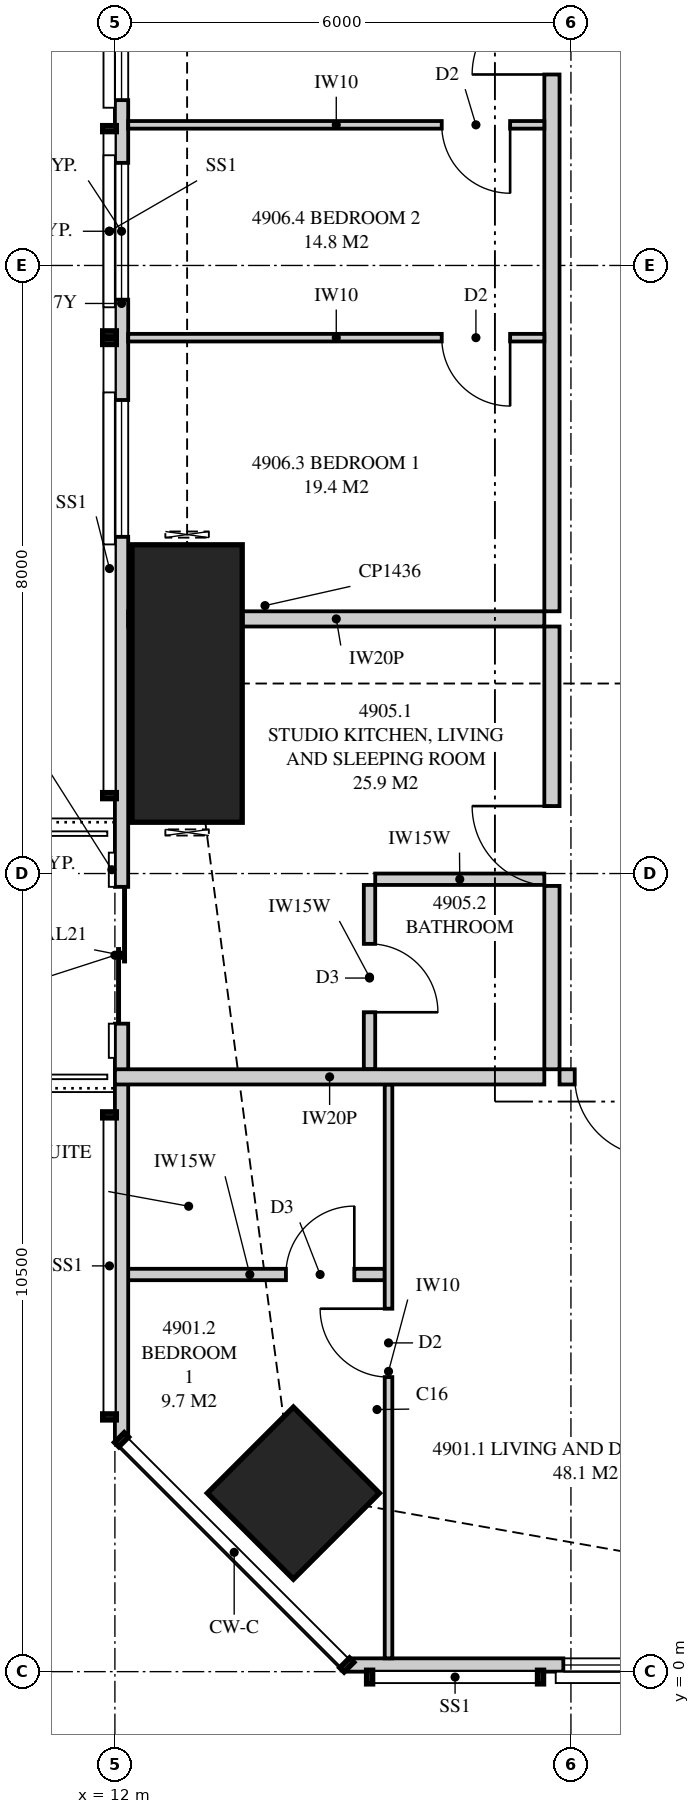
"""IFC4 building model, lengths in metres.
Left out: names, types, materials, properties, quantities, classifications, styles, units other than length and angle.
Written with IfcOpenShell. Run it as: python <this file> out.ifc"""

import sys

from ifc_helpers import new_model, si_unit, direction, frame, frame_2d, origin, origin_2d, place, context, subcontext, project, spatial, polyline, rectangle, outline, extrude, element, fill, save


model = new_model("IFC4")
c1 = context("Model", 3, precision=1e-05, world=origin(), true_north=direction((0.0, 1.0)))
c2 = subcontext(c1, "Body", "Model", "MODEL_VIEW")
j1 = project(units=[si_unit("LENGTHUNIT", "METRE"), si_unit("PLANEANGLEUNIT", "RADIAN")], contexts=[c1])
p1 = place(None, origin())
s1 = spatial("IfcSite", under=j1, at=p1, CompositionType="ELEMENT")
p2 = place(p1, origin())
s2 = spatial("IfcBuilding", under=s1, at=p2, CompositionType="ELEMENT")
p3 = place(p2, frame((0.0, 0.0, 181.15)))
s3 = spatial("IfcBuildingStorey", under=s2, at=p3, CompositionType="ELEMENT", Elevation=181.15)
p4 = place(p3, frame((14.348, 2.348, 0.0), z_axis=(0.0, 0.0, 1.0), x_axis=(0.707106781187, 0.707106781187, 0.0)))
e1 = element("IfcColumn", 1, at=p4, inside=s3, PredefinedType="COLUMN", context=c2, shape_type="SweptSolid", body=[
    extrude(rectangle(XDim=1.6, YDim=1.6, at=origin_2d()), origin(), (0.0, 0.0, 1.0), 3.35),
])
p5 = place(p3, frame((12.95, 13.0, 0.0), z_axis=(0.0, 0.0, 1.0), x_axis=(1.0, 0.0, 0.0)))
e2 = element("IfcColumn", 2, at=p5, inside=s3, PredefinedType="COLUMN", context=c2, shape_type="SweptSolid", body=[
    extrude(rectangle(XDim=1.45, YDim=3.65, at=origin_2d()), origin(), (0.0, 0.0, 1.0), 3.35),
])
p6 = place(p3, frame((15.051, 0.087, 0.0), z_axis=(0.0, 0.0, 1.0), x_axis=(1.0, 0.0, 0.0)))
e3 = element("IfcWall", 3, at=p6, inside=s3, PredefinedType="SOLIDWALL", context=c2, shape_type="SweptSolid", body=[
    extrude(outline(polyline([(0.0, 0.0), (34.897, 0.0), (34.897, 3.11), (27.91, 3.11), (27.91, 2.15), (27.836, 2.15), (27.836, 3.11), (27.699, 3.11), (27.699, 2.15), (7.199, 2.15), (7.199, 3.11), (7.062, 3.11), (7.062, 2.15), (6.987, 2.15), (6.987, 3.11), (0.0, 3.11), (0.0, 0.0)])), frame((0.0, 0.087, 0.0), z_axis=(0.0, -1.0, 0.0), x_axis=(1.0, 0.0, 0.0)), (0.0, 0.0, 1.0), 0.175),
])
p7 = place(p6, frame((2.849, 0.0, 0.4)))
e4 = element("IfcOpeningElement", 4, at=p7, cuts=e3, PredefinedType="OPENING", context=c2, shape_type="SweptSolid", body=[
    extrude(rectangle(XDim=2.4, YDim=1.7, at=frame_2d((1.2, 0.85))), frame((0.0, 0.097, 0.0), z_axis=(0.0, -1.0, 0.0), x_axis=(1.0, 0.0, 0.0)), (0.0, 0.0, 1.0), 0.195),
])
p8 = place(p6, frame((9.449, 0.0, 0.4)))
e5 = element("IfcOpeningElement", 5, at=p8, cuts=e3, PredefinedType="OPENING", context=c2, shape_type="SweptSolid", body=[
    extrude(rectangle(XDim=1.8, YDim=1.7, at=frame_2d((0.9, 0.85))), frame((0.0, 0.097, 0.0), z_axis=(0.0, -1.0, 0.0), x_axis=(1.0, 0.0, 0.0)), (0.0, 0.0, 1.0), 0.195),
])
p9 = place(p6, frame((13.561, 0.0, 0.0)))
e6 = element("IfcOpeningElement", 6, at=p9, cuts=e3, PredefinedType="OPENING", context=c2, shape_type="SweptSolid", body=[
    extrude(rectangle(XDim=1.8, YDim=2.1, at=frame_2d((0.9, 1.05))), frame((0.0, 0.097, 0.0), z_axis=(0.0, -1.0, 0.0), x_axis=(1.0, 0.0, 0.0)), (0.0, 0.0, 1.0), 0.195),
])
p10 = place(p6, frame((20.599, 0.0, 0.4)))
e7 = element("IfcOpeningElement", 7, at=p10, cuts=e3, PredefinedType="OPENING", context=c2, shape_type="SweptSolid", body=[
    extrude(rectangle(XDim=1.8, YDim=1.7, at=frame_2d((0.9, 0.85))), frame((0.0, 0.097, 0.0), z_axis=(0.0, -1.0, 0.0), x_axis=(1.0, 0.0, 0.0)), (0.0, 0.0, 1.0), 0.195),
])
p11 = place(p6, frame((23.974, 0.0, 0.4)))
e8 = element("IfcOpeningElement", 8, at=p11, cuts=e3, PredefinedType="OPENING", context=c2, shape_type="SweptSolid", body=[
    extrude(rectangle(XDim=1.8, YDim=1.7, at=frame_2d((0.9, 0.85))), frame((0.0, 0.097, 0.0), z_axis=(0.0, -1.0, 0.0), x_axis=(1.0, 0.0, 0.0)), (0.0, 0.0, 1.0), 0.195),
])
p12 = place(p6, frame((29.659, 0.0, 0.4)))
e9 = element("IfcOpeningElement", 9, at=p12, cuts=e3, PredefinedType="OPENING", context=c2, shape_type="SweptSolid", body=[
    extrude(rectangle(XDim=2.4, YDim=1.7, at=frame_2d((1.2, 0.85))), frame((0.0, 0.097, 0.0), z_axis=(0.0, -1.0, 0.0), x_axis=(1.0, 0.0, 0.0)), (0.0, 0.0, 1.0), 0.195),
])
p13 = place(p3, frame((12.087, 32.949, 0.0), z_axis=(0.0, 0.0, 1.0), x_axis=(0.0, -1.0, 0.0)))
e10 = element("IfcWall", 10, at=p13, inside=s3, PredefinedType="SOLIDWALL", context=c2, shape_type="SweptSolid", body=[
    extrude(outline(polyline([(0.0, 0.0), (29.897, 0.0), (29.897, 3.11), (20.191, 3.11), (20.191, 2.15), (20.051, 2.15), (20.051, 3.11), (19.949, 3.11), (19.949, 2.15), (7.949, 2.15), (7.949, 3.11), (7.823, 3.11), (7.823, 2.15), (7.73, 2.15), (7.73, 3.11), (0.0, 3.11), (0.0, 0.0)])), frame((0.0, 0.087, 0.0), z_axis=(0.0, -1.0, 0.0), x_axis=(1.0, 0.0, 0.0)), (0.0, 0.0, 1.0), 0.175),
])
p14 = place(p13, frame((1.237, 0.0, 0.4)))
e11 = element("IfcOpeningElement", 11, at=p14, cuts=e10, PredefinedType="OPENING", context=c2, shape_type="SweptSolid", body=[
    extrude(rectangle(XDim=1.2, YDim=1.7, at=frame_2d((0.6, 0.85))), frame((0.0, 0.097, 0.0), z_axis=(0.0, -1.0, 0.0), x_axis=(1.0, 0.0, 0.0)), (0.0, 0.0, 1.0), 0.195),
])
p15 = place(p13, frame((9.874, 0.0, 0.4)))
e12 = element("IfcOpeningElement", 12, at=p15, cuts=e10, PredefinedType="OPENING", context=c2, shape_type="SweptSolid", body=[
    extrude(rectangle(XDim=2.4, YDim=1.7, at=frame_2d((1.2, 0.85))), frame((0.0, 0.097, 0.0), z_axis=(0.0, -1.0, 0.0), x_axis=(1.0, 0.0, 0.0)), (0.0, 0.0, 1.0), 0.195),
])
p16 = place(p13, frame((13.099, 0.0, 0.4)))
e13 = element("IfcOpeningElement", 13, at=p16, cuts=e10, PredefinedType="OPENING", context=c2, shape_type="SweptSolid", body=[
    extrude(rectangle(XDim=1.8, YDim=1.7, at=frame_2d((0.9, 0.85))), frame((0.0, 0.097, 0.0), z_axis=(0.0, -1.0, 0.0), x_axis=(1.0, 0.0, 0.0)), (0.0, 0.0, 1.0), 0.195),
])
p17 = place(p13, frame((16.219, 0.0, 0.4)))
e14 = element("IfcOpeningElement", 14, at=p17, cuts=e10, PredefinedType="OPENING", context=c2, shape_type="SweptSolid", body=[
    extrude(rectangle(XDim=1.8, YDim=1.7, at=frame_2d((0.9, 0.85))), frame((0.0, 0.097, 0.0), z_axis=(0.0, -1.0, 0.0), x_axis=(1.0, 0.0, 0.0)), (0.0, 0.0, 1.0), 0.195),
])
p18 = place(p13, frame((22.624, 0.0, 0.0)))
e15 = element("IfcOpeningElement", 15, at=p18, cuts=e10, PredefinedType="OPENING", context=c2, shape_type="SweptSolid", body=[
    extrude(rectangle(XDim=1.8, YDim=2.1, at=frame_2d((0.9, 1.05))), frame((0.0, 0.097, 0.0), z_axis=(0.0, -1.0, 0.0), x_axis=(1.0, 0.0, 0.0)), (0.0, 0.0, 1.0), 0.195),
])
p19 = place(p3, frame((17.85, 7.825, 0.0), z_axis=(0.0, 0.0, 1.0), x_axis=(1.0, 0.0, 0.0)))
e16 = element("IfcWall", 16, at=p19, inside=s3, PredefinedType="PARTITIONING", context=c2, shape_type="SweptSolid", body=[
    extrude(outline(polyline([(0.0, 0.0), (5.65, 0.0), (5.65, 3.11), (4.737, 3.11), (4.737, 2.541), (4.062, 2.541), (4.062, 3.11), (0.0, 3.11), (0.0, 0.0)])), frame((0.0, 0.1, 0.0), z_axis=(0.0, -1.0, 0.0), x_axis=(1.0, 0.0, 0.0)), (0.0, 0.0, 1.0), 0.2),
])
p20 = place(p19, frame((0.2, 0.0, 0.0)))
e17 = element("IfcOpeningElement", 17, at=p20, cuts=e16, PredefinedType="OPENING", context=c2, shape_type="SweptSolid", body=[
    extrude(rectangle(XDim=1.05, YDim=2.2, at=frame_2d((0.525, 1.1))), frame((0.0, 0.11, 0.0), z_axis=(0.0, -1.0, 0.0), x_axis=(1.0, 0.0, 0.0)), (0.0, 0.0, 1.0), 0.22),
])
p21 = place(p3, frame((15.6, 0.175, 0.0), z_axis=(0.0, 0.0, 1.0), x_axis=(0.0, 1.0, 0.0)))
e18 = element("IfcWall", 18, at=p21, inside=s3, PredefinedType="PARTITIONING", context=c2, shape_type="SweptSolid", body=[
    extrude(outline(polyline([(0.0, 0.0), (7.55, 0.0), (7.55, 3.11), (2.825, 3.11), (2.825, 2.15), (1.079, 2.15), (1.079, 3.11), (0.0, 3.11), (0.0, 0.0)])), frame((0.0, 0.05, 0.0), z_axis=(0.0, -1.0, 0.0), x_axis=(1.0, 0.0, 0.0)), (0.0, 0.0, 1.0), 0.1),
])
p22 = place(p21, frame((3.7, 0.0, 0.0)))
e19 = element("IfcOpeningElement", 19, at=p22, cuts=e18, PredefinedType="OPENING", context=c2, shape_type="SweptSolid", body=[
    extrude(rectangle(XDim=0.9, YDim=2.1, at=frame_2d((0.45, 1.05))), frame((0.0, 0.06, 0.0), z_axis=(0.0, -1.0, 0.0), x_axis=(1.0, 0.0, 0.0)), (0.0, 0.0, 1.0), 0.12),
])
p23 = place(p3, frame((12.0, 5.225, 0.0), z_axis=(0.0, 0.0, 1.0), x_axis=(1.0, 0.0, 0.0)))
e20 = element("IfcWall", 20, at=p23, inside=s3, PredefinedType="PLUMBINGWALL", context=c2, shape_type="SweptSolid", body=[
    extrude(outline(polyline([(0.0, 0.0), (3.55, 0.0), (3.55, 3.11), (2.863, 3.11), (2.863, 2.15), (1.078, 2.15), (1.078, 3.11), (0.0, 3.11), (0.0, 0.0)])), frame((0.0, 0.075, 0.0), z_axis=(0.0, -1.0, 0.0), x_axis=(1.0, 0.0, 0.0)), (0.0, 0.0, 1.0), 0.15),
])
p24 = place(p23, frame((2.25, 0.0, 0.0)))
e21 = element("IfcOpeningElement", 21, at=p24, cuts=e20, PredefinedType="OPENING", context=c2, shape_type="SweptSolid", body=[
    extrude(rectangle(XDim=0.9, YDim=2.1, at=frame_2d((0.45, 1.05))), frame((0.0, 0.085, 0.0), z_axis=(0.0, -1.0, 0.0), x_axis=(1.0, 0.0, 0.0)), (0.0, 0.0, 1.0), 0.17),
])
p25 = place(p3, frame((12.0, 7.825, 0.0), z_axis=(0.0, 0.0, 1.0), x_axis=(1.0, 0.0, 0.0)))
e22 = element("IfcWall", 22, at=p25, inside=s3, PredefinedType="PARTITIONING", context=c2, shape_type="SweptSolid", body=[
    extrude(outline(polyline([(0.0, 0.0), (5.65, 0.0), (5.65, 3.11), (2.547, 3.11), (2.547, 2.15), (0.712, 2.15), (0.712, 3.11), (0.0, 3.11), (0.0, 0.0)])), frame((0.0, 0.1, 0.0), z_axis=(0.0, -1.0, 0.0), x_axis=(1.0, 0.0, 0.0)), (0.0, 0.0, 1.0), 0.2),
])
p26 = place(p3, frame((12.175, 13.85, 0.0), z_axis=(0.0, 0.0, 1.0), x_axis=(1.0, 0.0, 0.0)))
e23 = element("IfcWall", 23, at=p26, inside=s3, PredefinedType="PARTITIONING", context=c2, shape_type="SweptSolid", body=[
    extrude(outline(polyline([(0.529, 2.15), (0.0, 2.15), (0.0, 0.0), (0.529, 0.0), (0.529, 0.691), (1.021, 0.691), (1.021, 0.0), (5.475, 0.0), (5.475, 3.11), (1.685, 3.11), (1.685, 2.15), (1.021, 2.15), (1.021, 1.459), (0.529, 1.459), (0.529, 2.15)])), frame((0.0, 0.1, 0.0), z_axis=(0.0, -1.0, 0.0), x_axis=(1.0, 0.0, 0.0)), (0.0, 0.0, 1.0), 0.2),
])
p27 = place(p3, frame((17.75, 7.925, 0.0), z_axis=(0.0, 0.0, 1.0), x_axis=(0.0, 1.0, 0.0)))
e24 = element("IfcWall", 24, at=p27, inside=s3, PredefinedType="PARTITIONING", context=c2, shape_type="SweptSolid", body=[
    extrude(outline(polyline([(0.0, 0.0), (5.825, 0.0), (5.825, 3.11), (5.412, 3.11), (5.412, 2.541), (4.738, 2.541), (4.738, 3.11), (0.0, 3.11), (0.0, 0.0)])), frame((0.0, 0.1, 0.0), z_axis=(0.0, -1.0, 0.0), x_axis=(1.0, 0.0, 0.0)), (0.0, 0.0, 1.0), 0.2),
])
p28 = place(p27, frame((2.413, 0.0, 0.0)))
e25 = element("IfcOpeningElement", 25, at=p28, cuts=e24, PredefinedType="OPENING", context=c2, shape_type="SweptSolid", body=[
    extrude(rectangle(XDim=1.05, YDim=2.2, at=frame_2d((0.525, 1.1))), frame((0.0, 0.11, 0.0), z_axis=(0.0, -1.0, 0.0), x_axis=(1.0, 0.0, 0.0)), (0.0, 0.0, 1.0), 0.22),
])
p29 = place(p3, frame((15.35, 7.925, 0.0), z_axis=(0.0, 0.0, 1.0), x_axis=(0.0, 1.0, 0.0)))
e26 = element("IfcWall", 26, at=p29, inside=s3, PredefinedType="PLUMBINGWALL", context=c2, shape_type="SweptSolid", body=[
    extrude(rectangle(XDim=2.425, YDim=0.15, at=frame_2d((1.212, 0.0))), origin(), (0.0, 0.0, 1.0), 3.11),
])
p30 = place(p29, frame((0.75, 0.0, 0.0)))
e27 = element("IfcOpeningElement", 27, at=p30, cuts=e26, PredefinedType="OPENING", context=c2, shape_type="SweptSolid", body=[
    extrude(rectangle(XDim=0.9, YDim=2.1, at=frame_2d((0.45, 1.05))), frame((0.0, 0.085, 0.0), z_axis=(0.0, -1.0, 0.0), x_axis=(1.0, 0.0, 0.0)), (0.0, 0.0, 1.0), 0.17),
])
p31 = place(p3, frame((15.425, 10.425, 0.0), z_axis=(0.0, 0.0, 1.0), x_axis=(1.0, 0.0, 0.0)))
e28 = element("IfcWall", 28, at=p31, inside=s3, PredefinedType="PLUMBINGWALL", context=c2, shape_type="SweptSolid", body=[
    extrude(rectangle(XDim=2.225, YDim=0.15, at=frame_2d((1.112, 0.0))), origin(), (0.0, 0.0, 1.0), 3.11),
])
p32 = place(p3, frame((17.75, 13.95, 0.0), z_axis=(0.0, 0.0, 1.0), x_axis=(0.0, 1.0, 0.0)))
e29 = element("IfcWall", 29, at=p32, inside=s3, PredefinedType="PARTITIONING", context=c2, shape_type="SweptSolid", body=[
    extrude(outline(polyline([(0.0, 0.0), (15.125, 0.0), (15.125, 3.11), (11.387, 3.11), (11.387, 2.541), (10.713, 2.541), (10.713, 3.11), (0.0, 3.11), (0.0, 0.0)])), frame((0.0, 0.1, 0.0), z_axis=(0.0, -1.0, 0.0), x_axis=(1.0, 0.0, 0.0)), (0.0, 0.0, 1.0), 0.2),
])
p33 = place(p32, frame((7.062, 0.0, 0.0)))
e30 = element("IfcOpeningElement", 30, at=p33, cuts=e29, PredefinedType="OPENING", context=c2, shape_type="SweptSolid", body=[
    extrude(rectangle(XDim=1.05, YDim=2.2, at=frame_2d((0.525, 1.1))), frame((0.0, 0.11, 0.0), z_axis=(0.0, -1.0, 0.0), x_axis=(1.0, 0.0, 0.0)), (0.0, 0.0, 1.0), 0.22),
])
p34 = place(p3, frame((12.175, 17.55, 0.0), z_axis=(0.0, 0.0, 1.0), x_axis=(1.0, 0.0, 0.0)))
e31 = element("IfcWall", 31, at=p34, inside=s3, PredefinedType="PARTITIONING", context=c2, shape_type="SweptSolid", body=[
    extrude(outline(polyline([(0.0, 0.0), (5.475, 0.0), (5.475, 3.11), (1.635, 3.11), (1.635, 2.15), (0.0, 2.15), (0.0, 3.11), (0.0, 0.0)])), frame((0.0, 0.05, 0.0), z_axis=(0.0, -1.0, 0.0), x_axis=(1.0, 0.0, 0.0)), (0.0, 0.0, 1.0), 0.1),
])
p35 = place(p34, frame((4.125, 0.0, 0.0)))
e32 = element("IfcOpeningElement", 32, at=p35, cuts=e31, PredefinedType="OPENING", context=c2, shape_type="SweptSolid", body=[
    extrude(rectangle(XDim=0.9, YDim=2.1, at=frame_2d((0.45, 1.05))), frame((0.0, 0.06, 0.0), z_axis=(0.0, -1.0, 0.0), x_axis=(1.0, 0.0, 0.0)), (0.0, 0.0, 1.0), 0.12),
])
p36 = place(p3, frame((12.175, 20.35, 0.0), z_axis=(0.0, 0.0, 1.0), x_axis=(1.0, 0.0, 0.0)))
e33 = element("IfcWall", 33, at=p36, inside=s3, PredefinedType="PARTITIONING", context=c2, shape_type="SweptSolid", body=[
    extrude(outline(polyline([(0.0, 0.0), (5.475, 0.0), (5.475, 3.11), (1.635, 3.11), (1.635, 2.15), (0.0, 2.15), (0.0, 3.11), (0.0, 0.0)])), frame((0.0, 0.05, 0.0), z_axis=(0.0, -1.0, 0.0), x_axis=(1.0, 0.0, 0.0)), (0.0, 0.0, 1.0), 0.1),
])
p37 = place(p36, frame((4.125, 0.0, 0.0)))
e34 = element("IfcOpeningElement", 34, at=p37, cuts=e33, PredefinedType="OPENING", context=c2, shape_type="SweptSolid", body=[
    extrude(rectangle(XDim=0.9, YDim=2.1, at=frame_2d((0.45, 1.05))), frame((0.0, 0.06, 0.0), z_axis=(0.0, -1.0, 0.0), x_axis=(1.0, 0.0, 0.0)), (0.0, 0.0, 1.0), 0.12),
])
p38 = place(p7, origin())
e35 = element("IfcWindow", 35, at=p38, inside=s3, PartitioningType="SINGLE_PANEL", PredefinedType="WINDOW", context=c2, shape_type="SweptSolid", body=[
    extrude(rectangle(XDim=2.4, YDim=1.7, at=frame_2d((1.2, 0.85))), frame((0.0, 0.03, 0.0), z_axis=(0.0, -1.0, 0.0), x_axis=(1.0, 0.0, 0.0)), (0.0, 0.0, 1.0), 0.06),
])
fill(e4, e35)
p39 = place(p15, origin())
e36 = element("IfcWindow", 36, at=p39, inside=s3, PartitioningType="SINGLE_PANEL", PredefinedType="WINDOW", context=c2, shape_type="SweptSolid", body=[
    extrude(rectangle(XDim=2.4, YDim=1.7, at=frame_2d((1.2, 0.85))), frame((0.0, 0.03, 0.0), z_axis=(0.0, -1.0, 0.0), x_axis=(1.0, 0.0, 0.0)), (0.0, 0.0, 1.0), 0.06),
])
fill(e12, e36)
p40 = place(p16, origin())
e37 = element("IfcWindow", 37, at=p40, inside=s3, PartitioningType="SINGLE_PANEL", PredefinedType="WINDOW", context=c2, shape_type="SweptSolid", body=[
    extrude(rectangle(XDim=1.8, YDim=1.7, at=frame_2d((0.9, 0.85))), frame((0.0, 0.03, 0.0), z_axis=(0.0, -1.0, 0.0), x_axis=(1.0, 0.0, 0.0)), (0.0, 0.0, 1.0), 0.06),
])
fill(e13, e37)
p41 = place(p17, origin())
e38 = element("IfcWindow", 38, at=p41, inside=s3, PartitioningType="SINGLE_PANEL", PredefinedType="WINDOW", context=c2, shape_type="SweptSolid", body=[
    extrude(rectangle(XDim=1.8, YDim=1.7, at=frame_2d((0.9, 0.85))), frame((0.0, 0.03, 0.0), z_axis=(0.0, -1.0, 0.0), x_axis=(1.0, 0.0, 0.0)), (0.0, 0.0, 1.0), 0.06),
])
fill(e14, e38)
p42 = place(p18, origin())
e39 = element("IfcDoor", 39, at=p42, inside=s3, OperationType="SLIDING_TO_LEFT", PredefinedType="DOOR", context=c2, shape_type="SweptSolid", body=[
    extrude(rectangle(XDim=1.8, YDim=2.1, at=frame_2d((0.9, 1.05))), frame((0.0, 0.025, 0.0), z_axis=(0.0, -1.0, 0.0), x_axis=(1.0, 0.0, 0.0)), (0.0, 0.0, 1.0), 0.05),
])
fill(e15, e39)
p43 = place(p20, frame((1.05, 0.0, 0.0), z_axis=(0.0, 0.0, 1.0), x_axis=(-1.0, 0.0, 0.0)))
e40 = element("IfcDoor", 40, at=p43, inside=s3, OperationType="SINGLE_SWING_LEFT", PredefinedType="DOOR", context=c2, shape_type="SweptSolid", body=[
    extrude(rectangle(XDim=1.05, YDim=2.2, at=frame_2d((0.525, 1.1))), frame((0.0, 0.025, 0.0), z_axis=(0.0, -1.0, 0.0), x_axis=(1.0, 0.0, 0.0)), (0.0, 0.0, 1.0), 0.05),
])
fill(e17, e40)
p44 = place(p22, origin())
e41 = element("IfcDoor", 41, at=p44, inside=s3, OperationType="SINGLE_SWING_RIGHT", PredefinedType="DOOR", context=c2, shape_type="SweptSolid", body=[
    extrude(rectangle(XDim=0.9, YDim=2.1, at=frame_2d((0.45, 1.05))), frame((0.0, 0.025, 0.0), z_axis=(0.0, -1.0, 0.0), x_axis=(1.0, 0.0, 0.0)), (0.0, 0.0, 1.0), 0.05),
])
fill(e19, e41)
p45 = place(p24, origin())
e42 = element("IfcDoor", 42, at=p45, inside=s3, OperationType="SINGLE_SWING_RIGHT", PredefinedType="DOOR", context=c2, shape_type="SweptSolid", body=[
    extrude(rectangle(XDim=0.9, YDim=2.1, at=frame_2d((0.45, 1.05))), frame((0.0, 0.025, 0.0), z_axis=(0.0, -1.0, 0.0), x_axis=(1.0, 0.0, 0.0)), (0.0, 0.0, 1.0), 0.05),
])
fill(e21, e42)
p46 = place(p28, origin())
e43 = element("IfcDoor", 43, at=p46, inside=s3, OperationType="SINGLE_SWING_RIGHT", PredefinedType="DOOR", context=c2, shape_type="SweptSolid", body=[
    extrude(rectangle(XDim=1.05, YDim=2.2, at=frame_2d((0.525, 1.1))), frame((0.0, 0.025, 0.0), z_axis=(0.0, -1.0, 0.0), x_axis=(1.0, 0.0, 0.0)), (0.0, 0.0, 1.0), 0.05),
])
fill(e25, e43)
p47 = place(p30, frame((0.9, 0.0, 0.0), z_axis=(0.0, 0.0, 1.0), x_axis=(-1.0, 0.0, 0.0)))
e44 = element("IfcDoor", 44, at=p47, inside=s3, OperationType="SINGLE_SWING_RIGHT", PredefinedType="DOOR", context=c2, shape_type="SweptSolid", body=[
    extrude(rectangle(XDim=0.9, YDim=2.1, at=frame_2d((0.45, 1.05))), frame((0.0, 0.025, 0.0), z_axis=(0.0, -1.0, 0.0), x_axis=(1.0, 0.0, 0.0)), (0.0, 0.0, 1.0), 0.05),
])
fill(e27, e44)
p48 = place(p33, origin())
e45 = element("IfcDoor", 45, at=p48, inside=s3, OperationType="SINGLE_SWING_LEFT", PredefinedType="DOOR", context=c2, shape_type="SweptSolid", body=[
    extrude(rectangle(XDim=1.05, YDim=2.2, at=frame_2d((0.525, 1.1))), frame((0.0, 0.025, 0.0), z_axis=(0.0, -1.0, 0.0), x_axis=(1.0, 0.0, 0.0)), (0.0, 0.0, 1.0), 0.05),
])
fill(e30, e45)
p49 = place(p35, frame((0.9, 0.0, 0.0), z_axis=(0.0, 0.0, 1.0), x_axis=(-1.0, 0.0, 0.0)))
e46 = element("IfcDoor", 46, at=p49, inside=s3, OperationType="SINGLE_SWING_LEFT", PredefinedType="DOOR", context=c2, shape_type="SweptSolid", body=[
    extrude(rectangle(XDim=0.9, YDim=2.1, at=frame_2d((0.45, 1.05))), frame((0.0, 0.025, 0.0), z_axis=(0.0, -1.0, 0.0), x_axis=(1.0, 0.0, 0.0)), (0.0, 0.0, 1.0), 0.05),
])
fill(e32, e46)
p50 = place(p37, frame((0.9, 0.0, 0.0), z_axis=(0.0, 0.0, 1.0), x_axis=(-1.0, 0.0, 0.0)))
e47 = element("IfcDoor", 47, at=p50, inside=s3, OperationType="SINGLE_SWING_LEFT", PredefinedType="DOOR", context=c2, shape_type="SweptSolid", body=[
    extrude(rectangle(XDim=0.9, YDim=2.1, at=frame_2d((0.45, 1.05))), frame((0.0, 0.025, 0.0), z_axis=(0.0, -1.0, 0.0), x_axis=(1.0, 0.0, 0.0)), (0.0, 0.0, 1.0), 0.05),
])
fill(e34, e47)
save(model, sys.argv[1])
